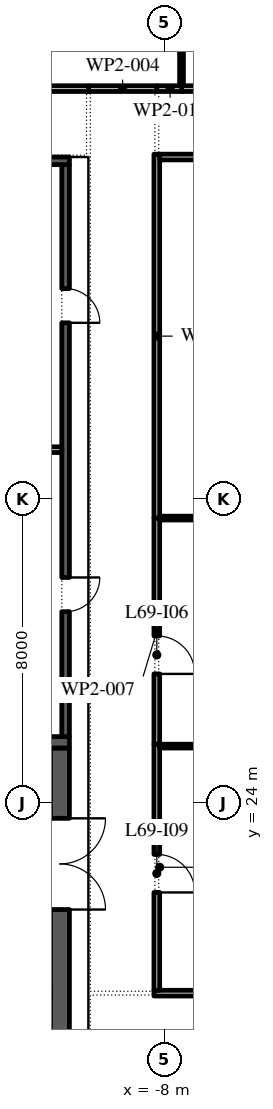
"""IFC4 building model, lengths in metres.
Left out: names, types, materials, properties, quantities, classifications, styles, units other than length and angle.
Written with IfcOpenShell. Run it as: python <this file> out.ifc"""

import sys

from ifc_helpers import new_model, si_unit, direction, frame, frame_2d, origin, place, context, subcontext, project, spatial, rectangle, extrude, element, fill, save


model = new_model("IFC4")
c1 = context("Model", 3, precision=1e-05, world=origin(), true_north=direction((0.0, 1.0)))
c2 = subcontext(c1, "Body", "Model", "MODEL_VIEW")
j1 = project(units=[si_unit("LENGTHUNIT", "METRE"), si_unit("PLANEANGLEUNIT", "RADIAN")], contexts=[c1])
p1 = place(None, origin())
s1 = spatial("IfcSite", under=j1, at=p1, CompositionType="ELEMENT")
p2 = place(p1, origin())
s2 = spatial("IfcBuilding", under=s1, at=p2, CompositionType="ELEMENT")
p3 = place(p2, frame((0.0, 0.0, 317.4)))
s3 = spatial("IfcBuildingStorey", under=s2, at=p3, CompositionType="ELEMENT", Elevation=317.4)
p4 = place(p3, frame((-10.75, -2.45, 0.0), z_axis=(0.0, 0.0, 1.0), x_axis=(0.0, 1.0, 0.0)))
e1 = element("IfcWall", 1, at=p4, inside=s3, PredefinedType="SHEAR", context=c2, shape_type="SweptSolid", body=[
    extrude(rectangle(XDim=27.9, YDim=0.5, at=frame_2d((13.95, 0.0))), origin(), (0.0, 0.0, 1.0), 4.0),
])
p5 = place(p4, frame((23.65, 0.0, 0.0)))
e2 = element("IfcOpeningElement", 2, at=p5, cuts=e1, PredefinedType="OPENING", context=c2, shape_type="SweptSolid", body=[
    extrude(rectangle(XDim=2.4, YDim=2.1, at=frame_2d((1.2, 1.05))), frame((0.0, 0.26, 0.0), z_axis=(0.0, -1.0, 0.0), x_axis=(1.0, 0.0, 0.0)), (0.0, 0.0, 1.0), 0.52),
])
p6 = place(p4, frame((1.087, 0.0, 0.0)))
e3 = element("IfcOpeningElement", 3, at=p6, cuts=e1, PredefinedType="OPENING", context=c2, shape_type="SweptSolid", body=[
    extrude(rectangle(XDim=0.9, YDim=2.1, at=frame_2d((0.45, 1.05))), frame((0.0, 0.26, 0.0), z_axis=(0.0, -1.0, 0.0), x_axis=(1.0, 0.0, 0.0)), (0.0, 0.0, 1.0), 0.52),
])
p7 = place(p4, frame((4.262, 0.0, 0.0)))
e4 = element("IfcOpeningElement", 4, at=p7, cuts=e1, PredefinedType="OPENING", context=c2, shape_type="SweptSolid", body=[
    extrude(rectangle(XDim=1.0, YDim=2.1, at=frame_2d((0.5, 1.05))), frame((0.0, 0.26, 0.0), z_axis=(0.0, -1.0, 0.0), x_axis=(1.0, 0.0, 0.0)), (0.0, 0.0, 1.0), 0.52),
])
p8 = place(p3, frame((-21.5, 25.6, 0.0), z_axis=(0.0, 0.0, 1.0), x_axis=(1.0, 0.0, 0.0)))
e5 = element("IfcWall", 5, at=p8, inside=s3, PredefinedType="SHEAR", context=c2, shape_type="SweptSolid", body=[
    extrude(rectangle(XDim=11.0, YDim=0.3, at=frame_2d((5.5, 0.0))), origin(), (0.0, 0.0, 1.0), 4.0),
])
p9 = place(p3, frame((-10.6, 25.75, 0.0), z_axis=(0.0, 0.0, 1.0), x_axis=(0.0, 1.0, 0.0)))
e6 = element("IfcWall", 6, at=p9, inside=s3, PredefinedType="SHEAR", context=c2, shape_type="SweptSolid", body=[
    extrude(rectangle(XDim=15.05, YDim=0.2, at=frame_2d((7.525, 0.0))), origin(), (0.0, 0.0, 1.0), 4.0),
])
p10 = place(p9, frame((3.288, 0.0, 0.0)))
e7 = element("IfcOpeningElement", 7, at=p10, cuts=e6, PredefinedType="OPENING", context=c2, shape_type="SweptSolid", body=[
    extrude(rectangle(XDim=0.9, YDim=2.1, at=frame_2d((0.45, 1.05))), frame((0.0, 0.11, 0.0), z_axis=(0.0, -1.0, 0.0), x_axis=(1.0, 0.0, 0.0)), (0.0, 0.0, 1.0), 0.22),
])
p11 = place(p9, frame((10.887, 0.0, 0.0)))
e8 = element("IfcOpeningElement", 8, at=p11, cuts=e6, PredefinedType="OPENING", context=c2, shape_type="SweptSolid", body=[
    extrude(rectangle(XDim=0.9, YDim=2.1, at=frame_2d((0.45, 1.05))), frame((0.0, 0.11, 0.0), z_axis=(0.0, -1.0, 0.0), x_axis=(1.0, 0.0, 0.0)), (0.0, 0.0, 1.0), 0.22),
])
p12 = place(p3, frame((-21.5, 40.9, 0.0), z_axis=(0.0, 0.0, 1.0), x_axis=(1.0, 0.0, 0.0)))
e9 = element("IfcWall", 9, at=p12, inside=s3, PredefinedType="SHEAR", context=c2, shape_type="SweptSolid", body=[
    extrude(rectangle(XDim=11.0, YDim=0.2, at=frame_2d((5.5, 0.0))), origin(), (0.0, 0.0, 1.0), 4.0),
])
p13 = place(p3, frame((-21.3, 33.3, 0.0), z_axis=(0.0, 0.0, 1.0), x_axis=(1.0, 0.0, 0.0)))
e10 = element("IfcWall", 10, at=p13, inside=s3, PredefinedType="PARTITIONING", context=c2, shape_type="SweptSolid", body=[
    extrude(rectangle(XDim=10.6, YDim=0.15, at=frame_2d((5.3, 0.0))), origin(), (0.0, 0.0, 1.0), 4.0),
])
p14 = place(p3, frame((-26.05, 42.8, 0.0), z_axis=(0.0, 0.0, 1.0), x_axis=(1.0, 0.0, 0.0)))
e11 = element("IfcWall", 11, at=p14, inside=s3, PredefinedType="PARTITIONING", context=c2, shape_type="SweptSolid", body=[
    extrude(rectangle(XDim=16.05, YDim=0.15, at=frame_2d((8.025, 0.0))), origin(), (0.0, 0.0, 1.0), 4.0),
])
p15 = place(p14, frame((4.15, 0.0, 0.0)))
e12 = element("IfcOpeningElement", 12, at=p15, cuts=e11, PredefinedType="OPENING", context=c2, shape_type="SweptSolid", body=[
    extrude(rectangle(XDim=1.0, YDim=2.1, at=frame_2d((0.5, 1.05))), frame((0.0, 0.085, 0.0), z_axis=(0.0, -1.0, 0.0), x_axis=(1.0, 0.0, 0.0)), (0.0, 0.0, 1.0), 0.17),
])
p16 = place(p3, frame((-10.0, 42.8, 0.0), z_axis=(0.0, 0.0, 1.0), x_axis=(1.0, 0.0, 0.0)))
e13 = element("IfcWall", 13, at=p16, inside=s3, PredefinedType="PARTITIONING", context=c2, shape_type="SweptSolid", body=[
    extrude(rectangle(XDim=1.8, YDim=0.15, at=frame_2d((0.9, 0.0))), origin(), (0.0, 0.0, 1.0), 4.0),
])
p17 = place(p3, frame((-8.275, 19.0, 0.0), z_axis=(0.0, 0.0, 1.0), x_axis=(1.0, 0.0, 0.0)))
e14 = element("IfcWall", 14, at=p17, inside=s3, PredefinedType="PARTITIONING", context=c2, shape_type="SweptSolid", body=[
    extrude(rectangle(XDim=4.325, YDim=0.15, at=frame_2d((2.163, 0.0))), origin(), (0.0, 0.0, 1.0), 4.0),
])
p18 = place(p3, frame((-8.2, 25.55, 0.0), z_axis=(0.0, 0.0, 1.0), x_axis=(0.0, -1.0, 0.0)))
e15 = element("IfcWall", 15, at=p18, inside=s3, PredefinedType="PARTITIONING", context=c2, shape_type="SweptSolid", body=[
    extrude(rectangle(XDim=6.475, YDim=0.15, at=frame_2d((3.238, 0.0))), origin(), (0.0, 0.0, 1.0), 4.0),
])
p19 = place(p18, frame((2.9, 0.0, 0.0)))
e16 = element("IfcOpeningElement", 16, at=p19, cuts=e15, PredefinedType="OPENING", context=c2, shape_type="SweptSolid", body=[
    extrude(rectangle(XDim=1.0, YDim=2.1, at=frame_2d((0.5, 1.05))), frame((0.0, 0.085, 0.0), z_axis=(0.0, -1.0, 0.0), x_axis=(1.0, 0.0, 0.0)), (0.0, 0.0, 1.0), 0.17),
])
p20 = place(p3, frame((-8.2, 31.5, 0.0), z_axis=(0.0, 0.0, 1.0), x_axis=(0.0, -1.0, 0.0)))
e17 = element("IfcWall", 17, at=p20, inside=s3, PredefinedType="PARTITIONING", context=c2, shape_type="SweptSolid", body=[
    extrude(rectangle(XDim=5.95, YDim=0.15, at=frame_2d((2.975, 0.0))), origin(), (0.0, 0.0, 1.0), 4.0),
])
p21 = place(p20, frame((3.1, 0.0, 0.0)))
e18 = element("IfcOpeningElement", 18, at=p21, cuts=e17, PredefinedType="OPENING", context=c2, shape_type="SweptSolid", body=[
    extrude(rectangle(XDim=1.0, YDim=2.1, at=frame_2d((0.5, 1.05))), frame((0.0, 0.085, 0.0), z_axis=(0.0, -1.0, 0.0), x_axis=(1.0, 0.0, 0.0)), (0.0, 0.0, 1.0), 0.17),
])
p22 = place(p3, frame((-8.125, 31.5, 0.0), z_axis=(0.0, 0.0, 1.0), x_axis=(1.0, 0.0, 0.0)))
e19 = element("IfcWall", 19, at=p22, inside=s3, PredefinedType="PARTITIONING", context=c2, shape_type="SweptSolid", body=[
    extrude(rectangle(XDim=10.675, YDim=0.1, at=frame_2d((5.337, 0.0))), origin(), (0.0, 0.0, 1.0), 4.0),
])
p23 = place(p3, frame((-8.2, 41.075, 0.0), z_axis=(0.0, 0.0, 1.0), x_axis=(0.0, -1.0, 0.0)))
e20 = element("IfcWall", 20, at=p23, inside=s3, PredefinedType="PARTITIONING", context=c2, shape_type="SweptSolid", body=[
    extrude(rectangle(XDim=9.575, YDim=0.15, at=frame_2d((4.788, 0.0))), origin(), (0.0, 0.0, 1.0), 4.0),
])
p24 = place(p3, frame((-8.2, 42.8, 0.0), z_axis=(0.0, 0.0, 1.0), x_axis=(1.0, 0.0, 0.0)))
e21 = element("IfcWall", 21, at=p24, inside=s3, PredefinedType="PARTITIONING", context=c2, shape_type="SweptSolid", body=[
    extrude(rectangle(XDim=0.7, YDim=0.15, at=frame_2d((0.35, 0.0))), origin(), (0.0, 0.0, 1.0), 4.0),
])
p25 = place(p3, frame((-7.55, 42.875, 0.0), z_axis=(0.0, 0.0, 1.0), x_axis=(0.0, 1.0, 0.0)))
e22 = element("IfcWall", 22, at=p25, inside=s3, PredefinedType="PARTITIONING", context=c2, shape_type="SweptSolid", body=[
    extrude(rectangle(XDim=9.925, YDim=0.1, at=frame_2d((4.962, 0.0))), origin(), (0.0, 0.0, 1.0), 4.0),
])
p26 = place(p3, frame((-7.55, 42.8, 0.0), z_axis=(0.0, 0.0, 1.0), x_axis=(1.0, 0.0, 0.0)))
e23 = element("IfcWall", 23, at=p26, inside=s3, PredefinedType="PARTITIONING", context=c2, shape_type="SweptSolid", body=[
    extrude(rectangle(XDim=15.15, YDim=0.15, at=frame_2d((7.575, 0.0))), origin(), (0.0, 0.0, 1.0), 4.0),
])
p27 = place(p26, frame((3.95, 0.0, 0.0)))
e24 = element("IfcOpeningElement", 24, at=p27, cuts=e23, PredefinedType="OPENING", context=c2, shape_type="SweptSolid", body=[
    extrude(rectangle(XDim=1.0, YDim=2.1, at=frame_2d((0.5, 1.05))), frame((0.0, 0.085, 0.0), z_axis=(0.0, -1.0, 0.0), x_axis=(1.0, 0.0, 0.0)), (0.0, 0.0, 1.0), 0.17),
])
p28 = place(p3, frame((-4.05, 25.5, 0.0), z_axis=(0.0, 0.0, 1.0), x_axis=(-1.0, 0.0, 0.0)))
e25 = element("IfcWall", 25, at=p28, inside=s3, PredefinedType="PARTITIONING", context=c2, shape_type="SweptSolid", body=[
    extrude(rectangle(XDim=4.075, YDim=0.1, at=frame_2d((2.038, 0.0))), origin(), (0.0, 0.0, 1.0), 4.0),
])
p29 = place(p3, frame((2.45, 41.0, 0.0), z_axis=(0.0, 0.0, 1.0), x_axis=(-1.0, 0.0, 0.0)))
e26 = element("IfcWall", 26, at=p29, inside=s3, PredefinedType="PARTITIONING", context=c2, shape_type="SweptSolid", body=[
    extrude(rectangle(XDim=10.575, YDim=0.15, at=frame_2d((5.288, 0.0))), origin(), (0.0, 0.0, 1.0), 4.0),
])
p30 = place(p29, frame((2.75, 0.0, 0.0)))
e27 = element("IfcOpeningElement", 27, at=p30, cuts=e26, PredefinedType="OPENING", context=c2, shape_type="SweptSolid", body=[
    extrude(rectangle(XDim=1.0, YDim=2.1, at=frame_2d((0.5, 1.05))), frame((0.0, 0.085, 0.0), z_axis=(0.0, -1.0, 0.0), x_axis=(1.0, 0.0, 0.0)), (0.0, 0.0, 1.0), 0.17),
])
p31 = place(p5, frame((2.4, 0.0, 0.0), z_axis=(0.0, 0.0, 1.0), x_axis=(-1.0, 0.0, 0.0)))
e28 = element("IfcDoor", 28, at=p31, inside=s3, OperationType="DOUBLE_DOOR_SINGLE_SWING", PredefinedType="DOOR", context=c2, shape_type="SweptSolid", body=[
    extrude(rectangle(XDim=2.4, YDim=2.1, at=frame_2d((1.2, 1.05))), frame((0.0, 0.025, 0.0), z_axis=(0.0, -1.0, 0.0), x_axis=(1.0, 0.0, 0.0)), (0.0, 0.0, 1.0), 0.05),
])
fill(e2, e28)
p32 = place(p10, frame((0.9, 0.15, 0.0), z_axis=(0.0, 0.0, 1.0), x_axis=(-1.0, 0.0, 0.0)))
e29 = element("IfcDoor", 29, at=p32, inside=s3, OperationType="SINGLE_SWING_RIGHT", PredefinedType="DOOR", context=c2, shape_type="SweptSolid", body=[
    extrude(rectangle(XDim=0.9, YDim=2.1, at=frame_2d((0.45, 1.05))), frame((0.0, 0.1, 0.0), z_axis=(0.0, -1.0, 0.0), x_axis=(1.0, 0.0, 0.0)), (0.0, 0.0, 1.0), 0.05),
])
fill(e7, e29)
p33 = place(p11, frame((0.9, 0.15, 0.0), z_axis=(0.0, 0.0, 1.0), x_axis=(-1.0, 0.0, 0.0)))
e30 = element("IfcDoor", 30, at=p33, inside=s3, OperationType="SINGLE_SWING_LEFT", PredefinedType="DOOR", context=c2, shape_type="SweptSolid", body=[
    extrude(rectangle(XDim=0.9, YDim=2.1, at=frame_2d((0.45, 1.05))), frame((0.0, 0.1, 0.0), z_axis=(0.0, -1.0, 0.0), x_axis=(1.0, 0.0, 0.0)), (0.0, 0.0, 1.0), 0.05),
])
fill(e8, e30)
p34 = place(p21, origin())
e31 = element("IfcDoor", 31, at=p34, inside=s3, OperationType="SINGLE_SWING_LEFT", PredefinedType="DOOR", context=c2, shape_type="SweptSolid", body=[
    extrude(rectangle(XDim=1.0, YDim=2.1, at=frame_2d((0.5, 1.05))), frame((0.0, 0.025, 0.0), z_axis=(0.0, -1.0, 0.0), x_axis=(1.0, 0.0, 0.0)), (0.0, 0.0, 1.0), 0.05),
])
fill(e18, e31)
p35 = place(p19, origin())
e32 = element("IfcDoor", 32, at=p35, inside=s3, OperationType="SINGLE_SWING_LEFT", PredefinedType="DOOR", context=c2, shape_type="SweptSolid", body=[
    extrude(rectangle(XDim=1.0, YDim=2.1, at=frame_2d((0.5, 1.05))), frame((0.0, 0.025, 0.0), z_axis=(0.0, -1.0, 0.0), x_axis=(1.0, 0.0, 0.0)), (0.0, 0.0, 1.0), 0.05),
])
fill(e16, e32)
save(model, sys.argv[1])
